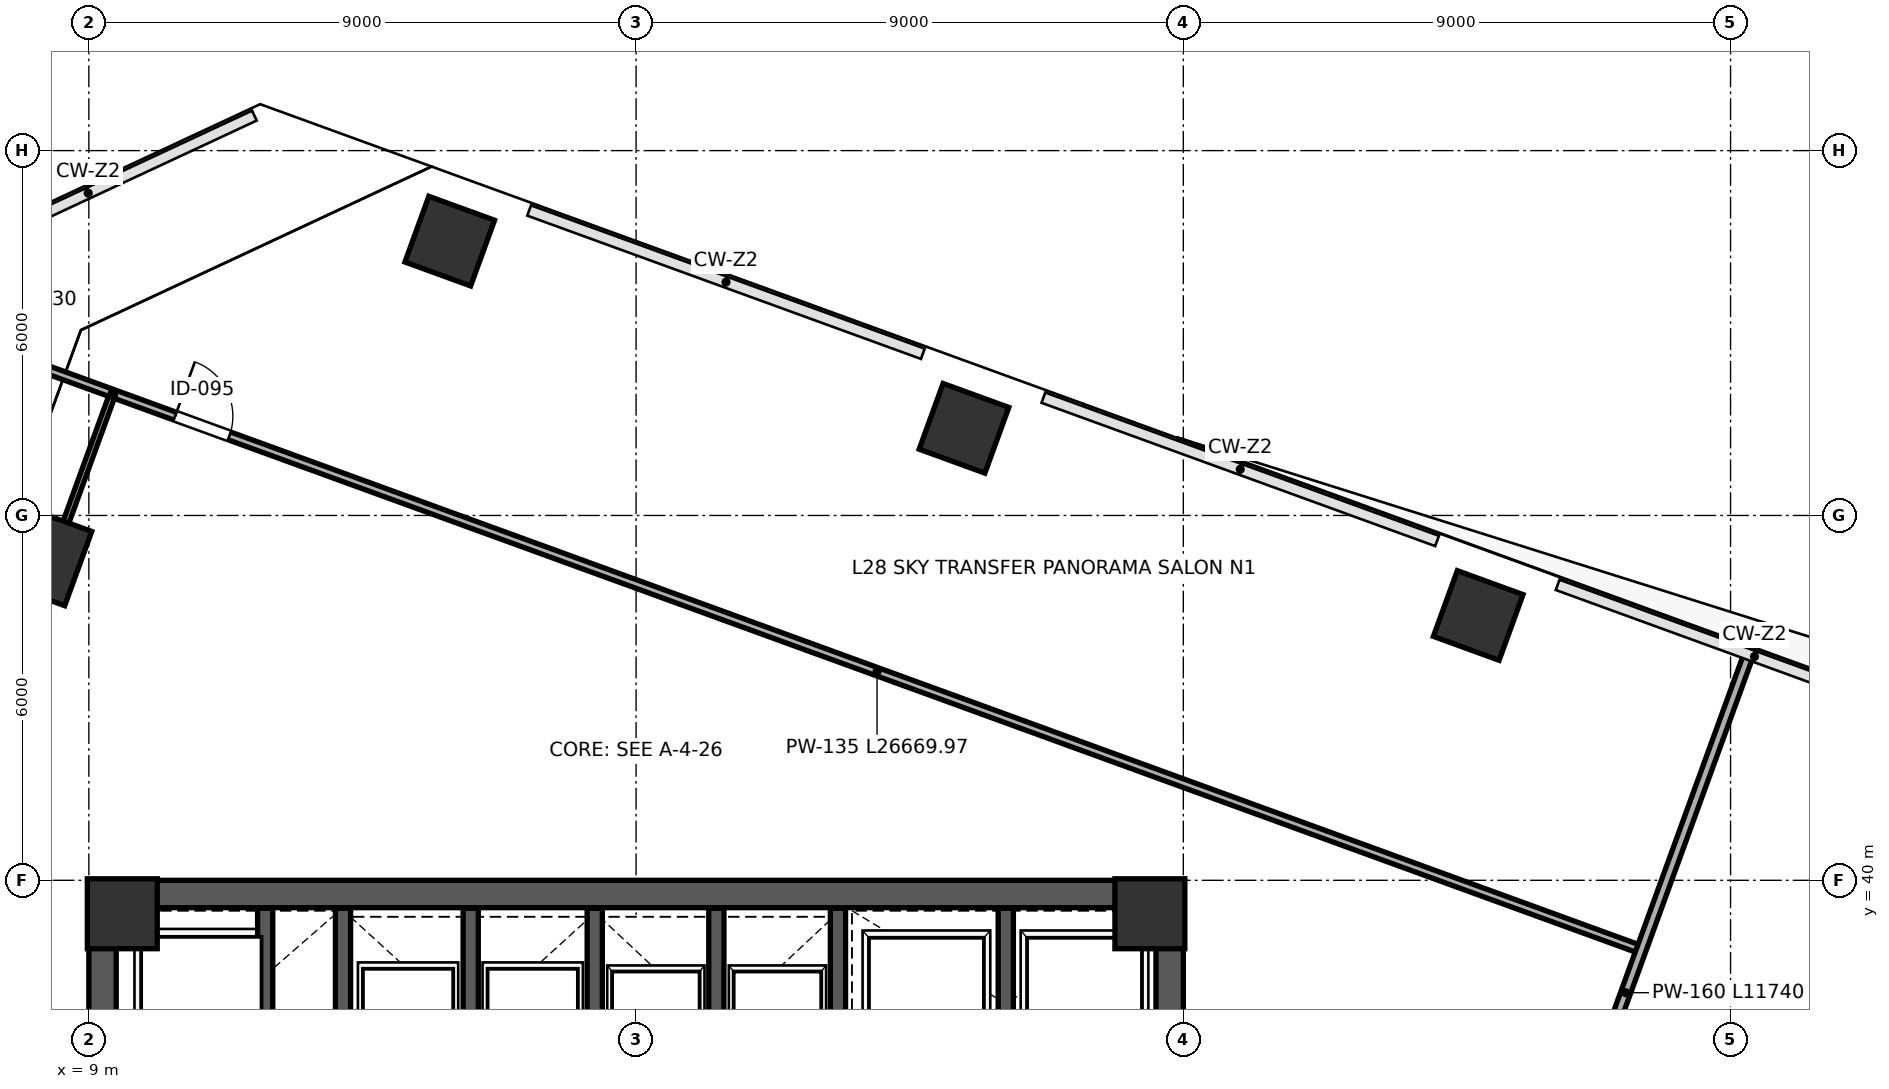
"""IFC4 building model, lengths in metres.
Left out: names, types, materials, properties, quantities, classifications, styles, units other than length and angle.
Written with IfcOpenShell. Run it as: python <this file> out.ifc"""

import sys

from ifc_helpers import new_model, si_unit, direction, frame, frame_2d, origin, origin_2d, place, context, subcontext, project, spatial, rectangle, extrude, source, transform, mapped, element, fill, save


model = new_model("IFC4")
c1 = context("Model", 3, precision=1e-05, world=origin(), true_north=direction((0.0, 1.0)))
c2 = subcontext(c1, "Body", "Model", "MODEL_VIEW")
j1 = project(units=[si_unit("LENGTHUNIT", "METRE"), si_unit("PLANEANGLEUNIT", "RADIAN")], contexts=[c1])
p1 = place(None, origin())
s1 = spatial("IfcSite", under=j1, at=p1, CompositionType="ELEMENT")
p2 = place(p1, origin())
s2 = spatial("IfcBuilding", under=s1, at=p2, CompositionType="ELEMENT")
p3 = place(p2, frame((0.0, 0.0, 127.6)))
s3 = spatial("IfcBuildingStorey", under=s2, at=p3, CompositionType="ELEMENT", Elevation=127.6)
m1 = source(origin(), c2, "Body", "SweptSolid", [
    extrude(rectangle(XDim=1.15, YDim=1.15, at=origin_2d()), origin(), (0.0, 0.0, 1.0), 5.398),
])
for number, where, z_axis, x_axis in (
    (1, (9.55, 39.45, 0.001), (0.0, 0.0, 1.0), (1.0, 0.0, 0.0)),
    (2, (26.45, 39.45, 0.001), (0.0, 0.0, 1.0), (1.0, 0.0, 0.0)),
):
    element("IfcColumn", number, at=place(p3, frame(where, z_axis=z_axis, x_axis=x_axis)), inside=s3, PredefinedType="COLUMN", context=c2, shape_type="MappedRepresentation", body=[
        mapped(m1, transform((0.0, 0.0, 0.0), scale=1.0)),
    ])
m2 = source(origin(), c2, "Body", "SweptSolid", [
    extrude(rectangle(XDim=1.15, YDim=1.15, at=origin_2d()), origin(), (0.0, 0.0, 1.0), 5.398),
])
for number, where, z_axis, x_axis in (
    (3, (14.935, 50.512, 0.001), (0.0, 0.0, 1.0), (-0.94, 0.342, 0.0)),
    (4, (23.393, 47.433, 0.001), (0.0, 0.0, 1.0), (-0.94, 0.342, 0.0)),
    (5, (31.85, 44.355, 0.001), (0.0, 0.0, 1.0), (-0.94, 0.342, 0.0)),
):
    element("IfcColumn", number, at=place(p3, frame(where, z_axis=z_axis, x_axis=x_axis)), inside=s3, PredefinedType="COLUMN", context=c2, shape_type="MappedRepresentation", body=[
        mapped(m2, transform((0.0, 0.0, 0.0), scale=1.0)),
    ])
m3 = source(origin(), c2, "Body", "SweptSolid", [
    extrude(rectangle(XDim=0.9, YDim=1.3, at=origin_2d()), origin(), (0.0, 0.0, 1.0), 5.398),
])
p4 = place(p3, frame((8.402, 45.281, 0.001), z_axis=(0.0, 0.0, 1.0), x_axis=(-0.939692620786, 0.342020143326, 0.0)))
e6 = element("IfcColumn", 6, at=p4, inside=s3, PredefinedType="PILASTER", context=c2, shape_type="MappedRepresentation", body=[
    mapped(m3, transform((0.0, 0.0, 0.0), scale=1.0)),
])
p5 = place(p3, frame((9.225, 24.45, 0.0), z_axis=(0.0, 0.0, 1.0), x_axis=(0.0, 1.0, 0.0)))
e7 = element("IfcWall", 7, at=p5, inside=s3, PredefinedType="SHEAR", context=c2, shape_type="SweptSolid", body=[
    extrude(rectangle(XDim=15.1, YDim=0.45, at=frame_2d((7.55, 0.0))), origin(), (0.0, 0.0, 1.0), 5.16),
])
p6 = place(p3, frame((26.775, 24.45, 0.0), z_axis=(0.0, 0.0, 1.0), x_axis=(0.0, 1.0, 0.0)))
e8 = element("IfcWall", 8, at=p6, inside=s3, PredefinedType="SHEAR", context=c2, shape_type="SweptSolid", body=[
    extrude(rectangle(XDim=15.1, YDim=0.45, at=frame_2d((7.55, 0.0))), origin(), (0.0, 0.0, 1.0), 5.16),
])
p7 = place(p6, frame((8.6, 0.0, 0.0)))
e9 = element("IfcOpeningElement", 9, at=p7, cuts=e8, PredefinedType="OPENING", context=c2, shape_type="SweptSolid", body=[
    extrude(rectangle(XDim=1.15, YDim=2.2, at=frame_2d((0.575, 1.1))), frame((0.0, 0.235, 0.0), z_axis=(0.0, -1.0, 0.0), x_axis=(1.0, 0.0, 0.0)), (0.0, 0.0, 1.0), 0.47),
])
p8 = place(p3, frame((9.0, 39.775, 0.0), z_axis=(0.0, 0.0, 1.0), x_axis=(1.0, 0.0, 0.0)))
e10 = element("IfcWall", 10, at=p8, inside=s3, PredefinedType="SHEAR", context=c2, shape_type="SweptSolid", body=[
    extrude(rectangle(XDim=18.0, YDim=0.45, at=frame_2d((9.0, 0.0))), origin(), (0.0, 0.0, 1.0), 5.16),
])
p9 = place(p3, frame((21.32, 32.12, 0.0), z_axis=(0.0, 0.0, 1.0), x_axis=(0.0, 1.0, 0.0)))
e11 = element("IfcWall", 11, at=p9, inside=s3, PredefinedType="SHEAR", context=c2, shape_type="SweptSolid", body=[
    extrude(rectangle(XDim=7.42, YDim=0.25, at=frame_2d((3.71, 0.0))), origin(), (0.0, 0.0, 1.0), 5.16),
])
p10 = place(p9, frame((1.4, 0.0, 0.0)))
e12 = element("IfcOpeningElement", 12, at=p10, cuts=e11, PredefinedType="OPENING", context=c2, shape_type="SweptSolid", body=[
    extrude(rectangle(XDim=1.15, YDim=2.2, at=frame_2d((0.575, 1.1))), frame((0.0, 0.135, 0.0), z_axis=(0.0, -1.0, 0.0), x_axis=(1.0, 0.0, 0.0)), (0.0, 0.0, 1.0), 0.27),
])
p11 = place(p3, frame((11.9, 36.31, 0.0), z_axis=(0.0, 0.0, 1.0), x_axis=(0.0, 1.0, 0.0)))
e13 = element("IfcWall", 13, at=p11, inside=s3, PredefinedType="SHEAR", context=c2, shape_type="SweptSolid", body=[
    extrude(rectangle(XDim=3.23, YDim=0.25, at=frame_2d((1.615, 0.0))), origin(), (0.0, 0.0, 1.0), 5.16),
])
p12 = place(p3, frame((24.08, 36.48, 0.0), z_axis=(0.0, 0.0, 1.0), x_axis=(0.0, 1.0, 0.0)))
e14 = element("IfcWall", 14, at=p12, inside=s3, PredefinedType="SHEAR", context=c2, shape_type="SweptSolid", body=[
    extrude(rectangle(XDim=3.06, YDim=0.25, at=frame_2d((1.53, 0.0))), origin(), (0.0, 0.0, 1.0), 5.16),
])
for number, where, z_axis, x_axis in (
    (15, (13.18, 35.81, 0.0), (0.0, 0.0, 1.0), (0.0, 1.0, 0.0)),
    (16, (15.28, 35.81, 0.0), (0.0, 0.0, 1.0), (0.0, 1.0, 0.0)),
    (17, (17.32, 35.81, 0.0), (0.0, 0.0, 1.0), (0.0, 1.0, 0.0)),
    (18, (19.32, 35.81, 0.0), (0.0, 0.0, 1.0), (0.0, 1.0, 0.0)),
):
    element("IfcWall", number, at=place(p3, frame(where, z_axis=z_axis, x_axis=x_axis)), inside=s3, PredefinedType="SHEAR", context=c2, shape_type="SweptSolid", body=[
        extrude(rectangle(XDim=3.73, YDim=0.25, at=frame_2d((1.865, 0.0))), origin(), (0.0, 0.0, 1.0), 5.16),
    ])
p13 = place(p3, frame((9.432, 47.992, 0.0), z_axis=(0.0, 0.0, 1.0), x_axis=(0.939693422468, -0.342017940715, 0.0)))
e19 = element("IfcWall", 19, at=p13, inside=s3, PredefinedType="PARTITIONING", context=c2, shape_type="SweptSolid", body=[
    extrude(rectangle(XDim=26.67, YDim=0.135, at=frame_2d((13.335, 0.0))), origin(), (0.0, 0.0, 1.0), 5.16),
])
p14 = place(p13, frame((1.05, 0.0, 0.0)))
e20 = element("IfcOpeningElement", 20, at=p14, cuts=e19, PredefinedType="OPENING", context=c2, shape_type="SweptSolid", body=[
    extrude(rectangle(XDim=0.95, YDim=2.15, at=frame_2d((0.475, 1.075))), frame((0.0, 0.078, 0.0), z_axis=(0.0, -1.0, 0.0), x_axis=(1.0, 0.0, 0.0)), (0.0, 0.0, 1.0), 0.155),
])
p15 = place(p3, frame((0.861, 24.56, 0.0), z_axis=(0.0, 0.0, 1.0), x_axis=(0.342022409736, 0.939691795877, 0.0)))
e21 = element("IfcWall", 21, at=p15, inside=s3, PredefinedType="PARTITIONING", context=c2, shape_type="SweptSolid", body=[
    extrude(rectangle(XDim=24.91, YDim=0.1, at=frame_2d((12.455, 0.0))), origin(), (0.0, 0.0, 1.0), 4.395),
])
p16 = place(p15, frame((3.0, 0.0, 0.0)))
e22 = element("IfcOpeningElement", 22, at=p16, cuts=e21, PredefinedType="OPENING", context=c2, shape_type="SweptSolid", body=[
    extrude(rectangle(XDim=0.95, YDim=2.15, at=frame_2d((0.475, 1.075))), frame((0.0, 0.06, 0.0), z_axis=(0.0, -1.0, 0.0), x_axis=(1.0, 0.0, 0.0)), (0.0, 0.0, 1.0), 0.12),
])
p17 = place(p3, frame((5.946, 49.261, 0.0), z_axis=(0.0, 0.0, 1.0), x_axis=(0.939679480515, -0.342056243766, 0.0)))
e23 = element("IfcWall", 23, at=p17, inside=s3, PredefinedType="PARTITIONING", context=c2, shape_type="SweptSolid", body=[
    extrude(rectangle(XDim=3.63, YDim=0.135, at=frame_2d((1.815, 0.0))), origin(), (0.0, 0.0, 1.0), 5.16),
])
p18 = place(p3, frame((32.267, 32.636, 0.0), z_axis=(0.0, 0.0, 1.0), x_axis=(0.34200686721, 0.939697452791, 0.0)))
e24 = element("IfcWall", 24, at=p18, inside=s3, PredefinedType="PARTITIONING", context=c2, shape_type="SweptSolid", body=[
    extrude(rectangle(XDim=11.74, YDim=0.16, at=frame_2d((5.87, 0.0))), origin(), (0.0, 0.0, 1.0), 4.395),
])
m4 = source(origin(), c2, "Body", "SweptSolid", [
    extrude(rectangle(XDim=0.95, YDim=2.15, at=frame_2d((0.475, 1.075))), frame((0.0, 0.025, 0.0), z_axis=(0.0, -1.0, 0.0), x_axis=(1.0, 0.0, 0.0)), (0.0, 0.0, 1.0), 0.05),
])
p19 = place(p14, origin())
e25 = element("IfcDoor", 25, at=p19, inside=s3, OperationType="SINGLE_SWING_LEFT", PredefinedType="DOOR", context=c2, shape_type="MappedRepresentation", body=[
    mapped(m4, transform((0.0, 0.0, 0.0), scale=1.0)),
])
fill(e20, e25)
save(model, sys.argv[1])
